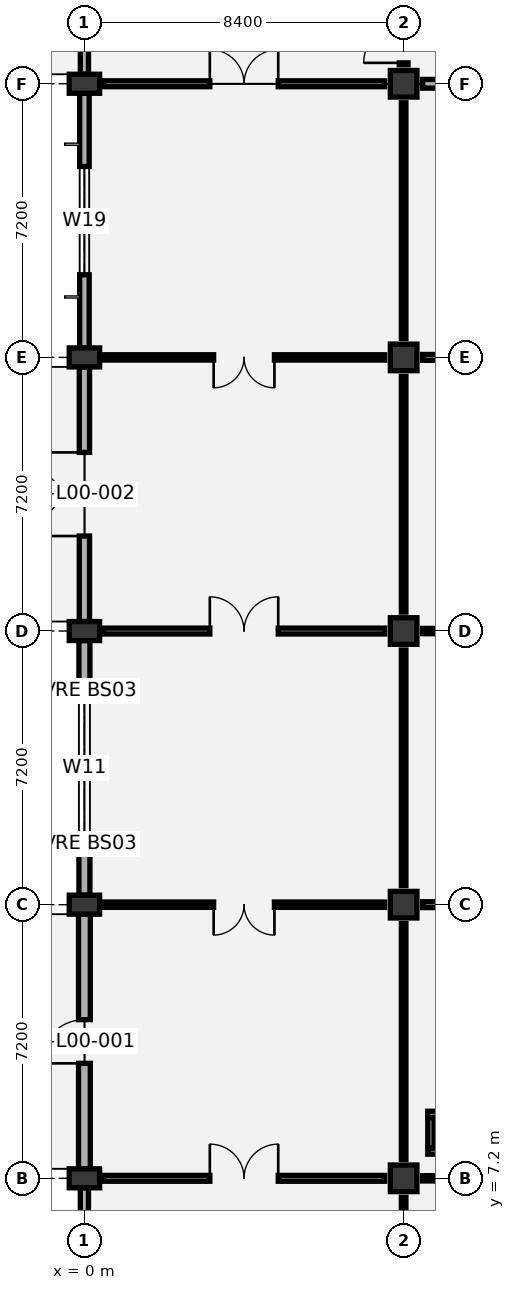
"""IFC4 building model, lengths in metres.
Left out: names, types, materials, properties, quantities, classifications, styles, units other than length and angle.
Written with IfcOpenShell. Run it as: python <this file> out.ifc"""

import sys

from ifc_helpers import new_model, si_unit, direction, frame, frame_2d, origin, origin_2d, place, context, subcontext, project, spatial, rectangle, extrude, element, fill, save


model = new_model("IFC4")
c1 = context("Model", 3, precision=1e-05, world=origin(), true_north=direction((0.0, 1.0)))
c2 = subcontext(c1, "Body", "Model", "MODEL_VIEW")
j1 = project(units=[si_unit("LENGTHUNIT", "METRE"), si_unit("PLANEANGLEUNIT", "RADIAN")], contexts=[c1])
p1 = place(None, origin())
s1 = spatial("IfcSite", under=j1, at=p1, CompositionType="ELEMENT")
p2 = place(p1, origin())
s2 = spatial("IfcBuilding", under=s1, at=p2, CompositionType="ELEMENT")
p3 = place(p2, origin())
s3 = spatial("IfcBuildingStorey", under=s2, at=p3, CompositionType="ELEMENT", Elevation=0.0)
for number, where, z_axis, x_axis in (
    (1, (0.0, 7.2, 0.0), (0.0, 0.0, 1.0), (0.0, 1.0, 0.0)),
    (2, (0.0, 14.4, 0.0), (0.0, 0.0, 1.0), (0.0, 1.0, 0.0)),
    (3, (0.0, 21.6, 0.0), (0.0, 0.0, 1.0), (0.0, 1.0, 0.0)),
    (4, (0.0, 28.8, 0.0), (0.0, 0.0, 1.0), (0.0, 1.0, 0.0)),
    (5, (0.0, 36.0, 0.0), (0.0, 0.0, 1.0), (0.0, 1.0, 0.0)),
):
    element("IfcColumn", number, at=place(p3, frame(where, z_axis=z_axis, x_axis=x_axis)), inside=s3, PredefinedType="COLUMN", context=c2, shape_type="SweptSolid", body=[
        extrude(rectangle(XDim=0.5, YDim=0.8, at=origin_2d()), origin(), (0.0, 0.0, 1.0), 6.0),
    ])
for number, where, z_axis, x_axis in (
    (6, (8.4, 7.2, 0.0), (0.0, 0.0, 1.0), (1.0, 0.0, 0.0)),
    (7, (8.4, 14.4, 0.0), (0.0, 0.0, 1.0), (1.0, 0.0, 0.0)),
    (8, (8.4, 21.6, 0.0), (0.0, 0.0, 1.0), (1.0, 0.0, 0.0)),
    (9, (8.4, 28.8, 0.0), (0.0, 0.0, 1.0), (1.0, 0.0, 0.0)),
    (10, (8.4, 36.0, 0.0), (0.0, 0.0, 1.0), (1.0, 0.0, 0.0)),
):
    element("IfcColumn", number, at=place(p3, frame(where, z_axis=z_axis, x_axis=x_axis)), inside=s3, PredefinedType="COLUMN", context=c2, shape_type="SweptSolid", body=[
        extrude(rectangle(XDim=0.7, YDim=0.7, at=origin_2d()), origin(), (0.0, 0.0, 1.0), 6.0),
    ])
p4 = place(p3, frame((0.0, 0.375, 0.0), z_axis=(0.0, 0.0, 1.0), x_axis=(0.0, 1.0, 0.0)))
e11 = element("IfcWall", 11, at=p4, inside=s3, PredefinedType="SOLIDWALL", context=c2, shape_type="SweptSolid", body=[
    extrude(rectangle(XDim=6.575, YDim=0.215, at=frame_2d((3.288, 0.0))), origin(), (0.0, 0.0, 1.0), 5.12),
])
p5 = place(p4, frame((2.087, 0.0, 0.9)))
e12 = element("IfcOpeningElement", 12, at=p5, cuts=e11, PredefinedType="OPENING", context=c2, shape_type="SweptSolid", body=[
    extrude(rectangle(XDim=2.4, YDim=2.1, at=frame_2d((1.2, 1.05))), frame((0.0, 0.117, 0.0), z_axis=(0.0, -1.0, 0.0), x_axis=(1.0, 0.0, 0.0)), (0.0, 0.0, 1.0), 0.235),
])
p6 = place(p3, frame((0.0, 7.45, 0.0), z_axis=(0.0, 0.0, 1.0), x_axis=(0.0, 1.0, 0.0)))
e13 = element("IfcWall", 13, at=p6, inside=s3, PredefinedType="SOLIDWALL", context=c2, shape_type="SweptSolid", body=[
    extrude(rectangle(XDim=6.7, YDim=0.31, at=frame_2d((3.35, 0.0))), origin(), (0.0, 0.0, 1.0), 5.12),
])
p7 = place(p6, frame((2.775, 0.0, 0.0)))
e14 = element("IfcOpeningElement", 14, at=p7, cuts=e13, PredefinedType="OPENING", context=c2, shape_type="SweptSolid", body=[
    extrude(rectangle(XDim=1.15, YDim=2.15, at=frame_2d((0.575, 1.075))), frame((0.0, 0.165, 0.0), z_axis=(0.0, -1.0, 0.0), x_axis=(1.0, 0.0, 0.0)), (0.0, 0.0, 1.0), 0.33),
])
p8 = place(p3, frame((0.0, 14.65, 0.0), z_axis=(0.0, 0.0, 1.0), x_axis=(0.0, 1.0, 0.0)))
e15 = element("IfcWall", 15, at=p8, inside=s3, PredefinedType="SOLIDWALL", context=c2, shape_type="SweptSolid", body=[
    extrude(rectangle(XDim=6.7, YDim=0.29, at=frame_2d((3.35, 0.0))), origin(), (0.0, 0.0, 1.0), 5.02),
])
p9 = place(p8, frame((1.55, 0.0, 0.9)))
e16 = element("IfcOpeningElement", 16, at=p9, cuts=e15, PredefinedType="OPENING", context=c2, shape_type="SweptSolid", body=[
    extrude(rectangle(XDim=3.6, YDim=2.4, at=frame_2d((1.8, 1.2))), frame((0.0, 0.155, 0.0), z_axis=(0.0, -1.0, 0.0), x_axis=(1.0, 0.0, 0.0)), (0.0, 0.0, 1.0), 0.31),
])
p10 = place(p3, frame((0.0, 21.85, 0.0), z_axis=(0.0, 0.0, 1.0), x_axis=(0.0, 1.0, 0.0)))
e17 = element("IfcWall", 17, at=p10, inside=s3, PredefinedType="SOLIDWALL", context=c2, shape_type="SweptSolid", body=[
    extrude(rectangle(XDim=6.7, YDim=0.27, at=frame_2d((3.35, 0.0))), origin(), (0.0, 0.0, 1.0), 5.02),
])
p11 = place(p10, frame((2.25, 0.0, 0.0)))
e18 = element("IfcOpeningElement", 18, at=p11, cuts=e17, PredefinedType="OPENING", context=c2, shape_type="SweptSolid", body=[
    extrude(rectangle(XDim=2.2, YDim=2.45, at=frame_2d((1.1, 1.225))), frame((0.0, 0.145, 0.0), z_axis=(0.0, -1.0, 0.0), x_axis=(1.0, 0.0, 0.0)), (0.0, 0.0, 1.0), 0.29),
])
p12 = place(p3, frame((0.0, 29.05, 0.0), z_axis=(0.0, 0.0, 1.0), x_axis=(0.0, 1.0, 0.0)))
e19 = element("IfcWall", 19, at=p12, inside=s3, PredefinedType="SOLIDWALL", context=c2, shape_type="SweptSolid", body=[
    extrude(rectangle(XDim=6.7, YDim=0.25, at=frame_2d((3.35, 0.0))), origin(), (0.0, 0.0, 1.0), 5.02),
])
p13 = place(p12, frame((1.925, 0.0, 0.9)))
e20 = element("IfcOpeningElement", 20, at=p13, cuts=e19, PredefinedType="OPENING", context=c2, shape_type="SweptSolid", body=[
    extrude(rectangle(XDim=2.85, YDim=1.95, at=frame_2d((1.425, 0.975))), frame((0.0, 0.135, 0.0), z_axis=(0.0, -1.0, 0.0), x_axis=(1.0, 0.0, 0.0)), (0.0, 0.0, 1.0), 0.27),
])
p14 = place(p3, frame((0.0, 36.25, 0.0), z_axis=(0.0, 0.0, 1.0), x_axis=(0.0, 1.0, 0.0)))
e21 = element("IfcWall", 21, at=p14, inside=s3, PredefinedType="SOLIDWALL", context=c2, shape_type="SweptSolid", body=[
    extrude(rectangle(XDim=6.7, YDim=0.215, at=frame_2d((3.35, 0.0))), origin(), (0.0, 0.0, 1.0), 5.02),
])
p15 = place(p14, frame((2.35, 0.0, 0.0)))
e22 = element("IfcOpeningElement", 22, at=p15, cuts=e21, PredefinedType="OPENING", context=c2, shape_type="SweptSolid", body=[
    extrude(rectangle(XDim=2.0, YDim=2.4, at=frame_2d((1.0, 1.2))), frame((0.0, 0.117, 0.0), z_axis=(0.0, -1.0, 0.0), x_axis=(1.0, 0.0, 0.0)), (0.0, 0.0, 1.0), 0.235),
])
for number, where, z_axis, x_axis in (
    (23, (9.035, 7.917, 0.0), (0.0, 0.0, 1.0), (1.0, 0.0, 0.0)),
    (24, (9.035, 8.883, 0.0), (0.0, 0.0, 1.0), (1.0, 0.0, 0.0)),
):
    element("IfcWall", number, at=place(p3, frame(where, z_axis=z_axis, x_axis=x_axis)), inside=s3, PredefinedType="PARTITIONING", context=c2, shape_type="SweptSolid", body=[
        extrude(rectangle(XDim=1.43, YDim=0.165, at=frame_2d((0.715, 0.0))), origin(), (0.0, 0.0, 1.0), 5.675),
    ])
p16 = place(p3, frame((9.117, 8.0, 0.0), z_axis=(0.0, 0.0, 1.0), x_axis=(0.0, 1.0, 0.0)))
e25 = element("IfcWall", 25, at=p16, inside=s3, PredefinedType="PARTITIONING", context=c2, shape_type="SweptSolid", body=[
    extrude(rectangle(XDim=0.8, YDim=0.165, at=frame_2d((0.4, 0.0))), origin(), (0.0, 0.0, 1.0), 5.675),
])
p17 = place(p3, frame((8.4, 0.5, 0.0), z_axis=(0.0, 0.0, 1.0), x_axis=(0.0, 1.0, 0.0)))
e26 = element("IfcWall", 26, at=p17, inside=s3, PredefinedType="PARTITIONING", context=c2, shape_type="SweptSolid", body=[
    extrude(rectangle(XDim=6.2, YDim=0.12, at=frame_2d((3.1, 0.0))), origin(), (0.0, 0.0, 1.0), 5.02),
])
p18 = place(p3, frame((0.5, 7.2, 0.0), z_axis=(0.0, 0.0, 1.0), x_axis=(1.0, 0.0, 0.0)))
e27 = element("IfcWall", 27, at=p18, inside=s3, PredefinedType="PARTITIONING", context=c2, shape_type="SweptSolid", body=[
    extrude(rectangle(XDim=7.4, YDim=0.155, at=frame_2d((3.7, 0.0))), origin(), (0.0, 0.0, 1.0), 4.97),
])
p19 = place(p18, frame((2.8, 0.0, 0.0)))
e28 = element("IfcOpeningElement", 28, at=p19, cuts=e27, PredefinedType="OPENING", context=c2, shape_type="SweptSolid", body=[
    extrude(rectangle(XDim=1.8, YDim=2.25, at=frame_2d((0.9, 1.125))), frame((0.0, 0.087, 0.0), z_axis=(0.0, -1.0, 0.0), x_axis=(1.0, 0.0, 0.0)), (0.0, 0.0, 1.0), 0.175),
])
p20 = place(p3, frame((8.4, 7.7, 0.0), z_axis=(0.0, 0.0, 1.0), x_axis=(0.0, 1.0, 0.0)))
e29 = element("IfcWall", 29, at=p20, inside=s3, PredefinedType="PARTITIONING", context=c2, shape_type="SweptSolid", body=[
    extrude(rectangle(XDim=6.2, YDim=0.12, at=frame_2d((3.1, 0.0))), origin(), (0.0, 0.0, 1.0), 5.48),
])
p21 = place(p3, frame((0.5, 14.4, 0.0), z_axis=(0.0, 0.0, 1.0), x_axis=(1.0, 0.0, 0.0)))
e30 = element("IfcWall", 30, at=p21, inside=s3, PredefinedType="PARTITIONING", context=c2, shape_type="SweptSolid", body=[
    extrude(rectangle(XDim=7.4, YDim=0.14, at=frame_2d((3.7, 0.0))), origin(), (0.0, 0.0, 1.0), 4.87),
])
p22 = place(p21, frame((2.9, 0.0, 0.0)))
e31 = element("IfcOpeningElement", 31, at=p22, cuts=e30, PredefinedType="OPENING", context=c2, shape_type="SweptSolid", body=[
    extrude(rectangle(XDim=1.6, YDim=2.2, at=frame_2d((0.8, 1.1))), frame((0.0, 0.08, 0.0), z_axis=(0.0, -1.0, 0.0), x_axis=(1.0, 0.0, 0.0)), (0.0, 0.0, 1.0), 0.16),
])
p23 = place(p3, frame((8.4, 14.9, 0.0), z_axis=(0.0, 0.0, 1.0), x_axis=(0.0, 1.0, 0.0)))
e32 = element("IfcWall", 32, at=p23, inside=s3, PredefinedType="PARTITIONING", context=c2, shape_type="SweptSolid", body=[
    extrude(rectangle(XDim=6.2, YDim=0.12, at=frame_2d((3.1, 0.0))), origin(), (0.0, 0.0, 1.0), 4.92),
])
p24 = place(p3, frame((0.5, 21.6, 0.0), z_axis=(0.0, 0.0, 1.0), x_axis=(1.0, 0.0, 0.0)))
e33 = element("IfcWall", 33, at=p24, inside=s3, PredefinedType="PARTITIONING", context=c2, shape_type="SweptSolid", body=[
    extrude(rectangle(XDim=7.4, YDim=0.155, at=frame_2d((3.7, 0.0))), origin(), (0.0, 0.0, 1.0), 4.87),
])
p25 = place(p24, frame((2.8, 0.0, 0.0)))
e34 = element("IfcOpeningElement", 34, at=p25, cuts=e33, PredefinedType="OPENING", context=c2, shape_type="SweptSolid", body=[
    extrude(rectangle(XDim=1.8, YDim=2.25, at=frame_2d((0.9, 1.125))), frame((0.0, 0.087, 0.0), z_axis=(0.0, -1.0, 0.0), x_axis=(1.0, 0.0, 0.0)), (0.0, 0.0, 1.0), 0.175),
])
p26 = place(p3, frame((8.4, 22.1, 0.0), z_axis=(0.0, 0.0, 1.0), x_axis=(0.0, 1.0, 0.0)))
e35 = element("IfcWall", 35, at=p26, inside=s3, PredefinedType="PARTITIONING", context=c2, shape_type="SweptSolid", body=[
    extrude(rectangle(XDim=6.2, YDim=0.12, at=frame_2d((3.1, 0.0))), origin(), (0.0, 0.0, 1.0), 5.17),
])
p27 = place(p3, frame((0.5, 28.8, 0.0), z_axis=(0.0, 0.0, 1.0), x_axis=(1.0, 0.0, 0.0)))
e36 = element("IfcWall", 36, at=p27, inside=s3, PredefinedType="PARTITIONING", context=c2, shape_type="SweptSolid", body=[
    extrude(rectangle(XDim=7.4, YDim=0.14, at=frame_2d((3.7, 0.0))), origin(), (0.0, 0.0, 1.0), 4.87),
])
p28 = place(p27, frame((2.9, 0.0, 0.0)))
e37 = element("IfcOpeningElement", 37, at=p28, cuts=e36, PredefinedType="OPENING", context=c2, shape_type="SweptSolid", body=[
    extrude(rectangle(XDim=1.6, YDim=2.2, at=frame_2d((0.8, 1.1))), frame((0.0, 0.08, 0.0), z_axis=(0.0, -1.0, 0.0), x_axis=(1.0, 0.0, 0.0)), (0.0, 0.0, 1.0), 0.16),
])
p29 = place(p3, frame((8.4, 29.3, 0.0), z_axis=(0.0, 0.0, 1.0), x_axis=(0.0, 1.0, 0.0)))
e38 = element("IfcWall", 38, at=p29, inside=s3, PredefinedType="PARTITIONING", context=c2, shape_type="SweptSolid", body=[
    extrude(rectangle(XDim=6.2, YDim=0.12, at=frame_2d((3.1, 0.0))), origin(), (0.0, 0.0, 1.0), 4.92),
])
p30 = place(p3, frame((0.5, 36.0, 0.0), z_axis=(0.0, 0.0, 1.0), x_axis=(1.0, 0.0, 0.0)))
e39 = element("IfcWall", 39, at=p30, inside=s3, PredefinedType="PARTITIONING", context=c2, shape_type="SweptSolid", body=[
    extrude(rectangle(XDim=7.4, YDim=0.155, at=frame_2d((3.7, 0.0))), origin(), (0.0, 0.0, 1.0), 4.87),
])
p31 = place(p30, frame((2.8, 0.0, 0.0)))
e40 = element("IfcOpeningElement", 40, at=p31, cuts=e39, PredefinedType="OPENING", context=c2, shape_type="SweptSolid", body=[
    extrude(rectangle(XDim=1.8, YDim=2.25, at=frame_2d((0.9, 1.125))), frame((0.0, 0.087, 0.0), z_axis=(0.0, -1.0, 0.0), x_axis=(1.0, 0.0, 0.0)), (0.0, 0.0, 1.0), 0.175),
])
p32 = place(p3, frame((8.4, 36.5, 0.0), z_axis=(0.0, 0.0, 1.0), x_axis=(0.0, 1.0, 0.0)))
e41 = element("IfcWall", 41, at=p32, inside=s3, PredefinedType="PARTITIONING", context=c2, shape_type="SweptSolid", body=[
    extrude(rectangle(XDim=6.2, YDim=0.23, at=frame_2d((3.1, 0.0))), origin(), (0.0, 0.0, 1.0), 5.27),
])
p33 = place(p32, frame((0.05, 0.0, 0.0)))
e42 = element("IfcOpeningElement", 42, at=p33, cuts=e41, PredefinedType="OPENING", context=c2, shape_type="SweptSolid", body=[
    extrude(rectangle(XDim=1.05, YDim=2.15, at=frame_2d((0.525, 1.075))), frame((0.0, 0.125, 0.0), z_axis=(0.0, -1.0, 0.0), x_axis=(1.0, 0.0, 0.0)), (0.0, 0.0, 1.0), 0.25),
])
p34 = place(p3, frame((8.9, 7.2, 0.0), z_axis=(0.0, 0.0, 1.0), x_axis=(1.0, 0.0, 0.0)))
e43 = element("IfcWall", 43, at=p34, inside=s3, PredefinedType="PARTITIONING", context=c2, shape_type="SweptSolid", body=[
    extrude(rectangle(XDim=7.4, YDim=0.14, at=frame_2d((3.7, 0.0))), origin(), (0.0, 0.0, 1.0), 4.97),
])
p35 = place(p34, frame((2.9, 0.0, 0.0)))
e44 = element("IfcOpeningElement", 44, at=p35, cuts=e43, PredefinedType="OPENING", context=c2, shape_type="SweptSolid", body=[
    extrude(rectangle(XDim=1.6, YDim=2.2, at=frame_2d((0.8, 1.1))), frame((0.0, 0.08, 0.0), z_axis=(0.0, -1.0, 0.0), x_axis=(1.0, 0.0, 0.0)), (0.0, 0.0, 1.0), 0.16),
])
p36 = place(p3, frame((8.9, 14.4, 0.0), z_axis=(0.0, 0.0, 1.0), x_axis=(1.0, 0.0, 0.0)))
e45 = element("IfcWall", 45, at=p36, inside=s3, PredefinedType="PARTITIONING", context=c2, shape_type="SweptSolid", body=[
    extrude(rectangle(XDim=7.4, YDim=0.155, at=frame_2d((3.7, 0.0))), origin(), (0.0, 0.0, 1.0), 4.87),
])
p37 = place(p36, frame((2.8, 0.0, 0.0)))
e46 = element("IfcOpeningElement", 46, at=p37, cuts=e45, PredefinedType="OPENING", context=c2, shape_type="SweptSolid", body=[
    extrude(rectangle(XDim=1.8, YDim=2.25, at=frame_2d((0.9, 1.125))), frame((0.0, 0.087, 0.0), z_axis=(0.0, -1.0, 0.0), x_axis=(1.0, 0.0, 0.0)), (0.0, 0.0, 1.0), 0.175),
])
p38 = place(p3, frame((8.9, 21.6, 0.0), z_axis=(0.0, 0.0, 1.0), x_axis=(1.0, 0.0, 0.0)))
e47 = element("IfcWall", 47, at=p38, inside=s3, PredefinedType="PARTITIONING", context=c2, shape_type="SweptSolid", body=[
    extrude(rectangle(XDim=7.4, YDim=0.14, at=frame_2d((3.7, 0.0))), origin(), (0.0, 0.0, 1.0), 4.87),
])
p39 = place(p38, frame((2.8, 0.0, 0.0)))
e48 = element("IfcOpeningElement", 48, at=p39, cuts=e47, PredefinedType="OPENING", context=c2, shape_type="SweptSolid", body=[
    extrude(rectangle(XDim=1.8, YDim=2.25, at=frame_2d((0.9, 1.125))), frame((0.0, 0.08, 0.0), z_axis=(0.0, -1.0, 0.0), x_axis=(1.0, 0.0, 0.0)), (0.0, 0.0, 1.0), 0.16),
])
p40 = place(p3, frame((8.9, 28.8, 0.0), z_axis=(0.0, 0.0, 1.0), x_axis=(1.0, 0.0, 0.0)))
e49 = element("IfcWall", 49, at=p40, inside=s3, PredefinedType="PARTITIONING", context=c2, shape_type="SweptSolid", body=[
    extrude(rectangle(XDim=7.4, YDim=0.155, at=frame_2d((3.7, 0.0))), origin(), (0.0, 0.0, 1.0), 4.87),
])
p41 = place(p40, frame((2.9, 0.0, 0.0)))
e50 = element("IfcOpeningElement", 50, at=p41, cuts=e49, PredefinedType="OPENING", context=c2, shape_type="SweptSolid", body=[
    extrude(rectangle(XDim=1.6, YDim=2.2, at=frame_2d((0.8, 1.1))), frame((0.0, 0.087, 0.0), z_axis=(0.0, -1.0, 0.0), x_axis=(1.0, 0.0, 0.0)), (0.0, 0.0, 1.0), 0.175),
])
p42 = place(p3, frame((8.9, 36.0, 0.0), z_axis=(0.0, 0.0, 1.0), x_axis=(1.0, 0.0, 0.0)))
e51 = element("IfcWall", 51, at=p42, inside=s3, PredefinedType="PARTITIONING", context=c2, shape_type="SweptSolid", body=[
    extrude(rectangle(XDim=7.4, YDim=0.23, at=frame_2d((3.7, 0.0))), origin(), (0.0, 0.0, 1.0), 4.87),
])
p43 = place(p42, frame((2.95, 0.0, 0.0)))
e52 = element("IfcOpeningElement", 52, at=p43, cuts=e51, PredefinedType="OPENING", context=c2, shape_type="SweptSolid", body=[
    extrude(rectangle(XDim=1.5, YDim=2.15, at=frame_2d((0.75, 1.075))), frame((0.0, 0.125, 0.0), z_axis=(0.0, -1.0, 0.0), x_axis=(1.0, 0.0, 0.0)), (0.0, 0.0, 1.0), 0.25),
])
p44 = place(p7, origin())
e53 = element("IfcDoor", 53, at=p44, inside=s3, OperationType="SINGLE_SWING_LEFT", PredefinedType="DOOR", context=c2, shape_type="SweptSolid", body=[
    extrude(rectangle(XDim=1.15, YDim=2.15, at=frame_2d((0.575, 1.075))), frame((0.0, 0.025, 0.0), z_axis=(0.0, -1.0, 0.0), x_axis=(1.0, 0.0, 0.0)), (0.0, 0.0, 1.0), 0.05),
])
fill(e14, e53)
p45 = place(p9, origin())
e54 = element("IfcWindow", 54, at=p45, inside=s3, PartitioningType="SINGLE_PANEL", PredefinedType="WINDOW", context=c2, shape_type="SweptSolid", body=[
    extrude(rectangle(XDim=3.6, YDim=2.4, at=frame_2d((1.8, 1.2))), frame((0.0, 0.03, 0.0), z_axis=(0.0, -1.0, 0.0), x_axis=(1.0, 0.0, 0.0)), (0.0, 0.0, 1.0), 0.06),
])
fill(e16, e54)
p46 = place(p11, origin())
e55 = element("IfcDoor", 55, at=p46, inside=s3, OperationType="DOUBLE_DOOR_SINGLE_SWING", PredefinedType="DOOR", context=c2, shape_type="SweptSolid", body=[
    extrude(rectangle(XDim=2.2, YDim=2.45, at=frame_2d((1.1, 1.225))), frame((0.0, 0.025, 0.0), z_axis=(0.0, -1.0, 0.0), x_axis=(1.0, 0.0, 0.0)), (0.0, 0.0, 1.0), 0.05),
])
fill(e18, e55)
p47 = place(p13, origin())
e56 = element("IfcWindow", 56, at=p47, inside=s3, PartitioningType="SINGLE_PANEL", PredefinedType="WINDOW", context=c2, shape_type="SweptSolid", body=[
    extrude(rectangle(XDim=2.85, YDim=1.95, at=frame_2d((1.425, 0.975))), frame((0.0, 0.03, 0.0), z_axis=(0.0, -1.0, 0.0), x_axis=(1.0, 0.0, 0.0)), (0.0, 0.0, 1.0), 0.06),
])
fill(e20, e56)
p48 = place(p19, origin())
e57 = element("IfcDoor", 57, at=p48, inside=s3, OperationType="DOUBLE_DOOR_SINGLE_SWING", PredefinedType="DOOR", context=c2, shape_type="SweptSolid", body=[
    extrude(rectangle(XDim=1.8, YDim=2.25, at=frame_2d((0.9, 1.125))), frame((0.0, 0.025, 0.0), z_axis=(0.0, -1.0, 0.0), x_axis=(1.0, 0.0, 0.0)), (0.0, 0.0, 1.0), 0.05),
])
fill(e28, e57)
p49 = place(p22, frame((1.6, 0.0, 0.0), z_axis=(0.0, 0.0, 1.0), x_axis=(-1.0, 0.0, 0.0)))
e58 = element("IfcDoor", 58, at=p49, inside=s3, OperationType="DOUBLE_DOOR_SINGLE_SWING", PredefinedType="DOOR", context=c2, shape_type="SweptSolid", body=[
    extrude(rectangle(XDim=1.6, YDim=2.2, at=frame_2d((0.8, 1.1))), frame((0.0, 0.025, 0.0), z_axis=(0.0, -1.0, 0.0), x_axis=(1.0, 0.0, 0.0)), (0.0, 0.0, 1.0), 0.05),
])
fill(e31, e58)
p50 = place(p25, origin())
e59 = element("IfcDoor", 59, at=p50, inside=s3, OperationType="DOUBLE_DOOR_SINGLE_SWING", PredefinedType="DOOR", context=c2, shape_type="SweptSolid", body=[
    extrude(rectangle(XDim=1.8, YDim=2.25, at=frame_2d((0.9, 1.125))), frame((0.0, 0.025, 0.0), z_axis=(0.0, -1.0, 0.0), x_axis=(1.0, 0.0, 0.0)), (0.0, 0.0, 1.0), 0.05),
])
fill(e34, e59)
p51 = place(p28, frame((1.6, 0.0, 0.0), z_axis=(0.0, 0.0, 1.0), x_axis=(-1.0, 0.0, 0.0)))
e60 = element("IfcDoor", 60, at=p51, inside=s3, OperationType="DOUBLE_DOOR_SINGLE_SWING", PredefinedType="DOOR", context=c2, shape_type="SweptSolid", body=[
    extrude(rectangle(XDim=1.6, YDim=2.2, at=frame_2d((0.8, 1.1))), frame((0.0, 0.025, 0.0), z_axis=(0.0, -1.0, 0.0), x_axis=(1.0, 0.0, 0.0)), (0.0, 0.0, 1.0), 0.05),
])
fill(e37, e60)
p52 = place(p31, origin())
e61 = element("IfcDoor", 61, at=p52, inside=s3, OperationType="DOUBLE_DOOR_SINGLE_SWING", PredefinedType="DOOR", context=c2, shape_type="SweptSolid", body=[
    extrude(rectangle(XDim=1.8, YDim=2.25, at=frame_2d((0.9, 1.125))), frame((0.0, 0.025, 0.0), z_axis=(0.0, -1.0, 0.0), x_axis=(1.0, 0.0, 0.0)), (0.0, 0.0, 1.0), 0.05),
])
fill(e40, e61)
p53 = place(p33, origin())
e62 = element("IfcDoor", 62, at=p53, inside=s3, OperationType="SINGLE_SWING_LEFT", PredefinedType="DOOR", context=c2, shape_type="SweptSolid", body=[
    extrude(rectangle(XDim=1.05, YDim=2.15, at=frame_2d((0.525, 1.075))), frame((0.0, 0.025, 0.0), z_axis=(0.0, -1.0, 0.0), x_axis=(1.0, 0.0, 0.0)), (0.0, 0.0, 1.0), 0.05),
])
fill(e42, e62)
save(model, sys.argv[1])
